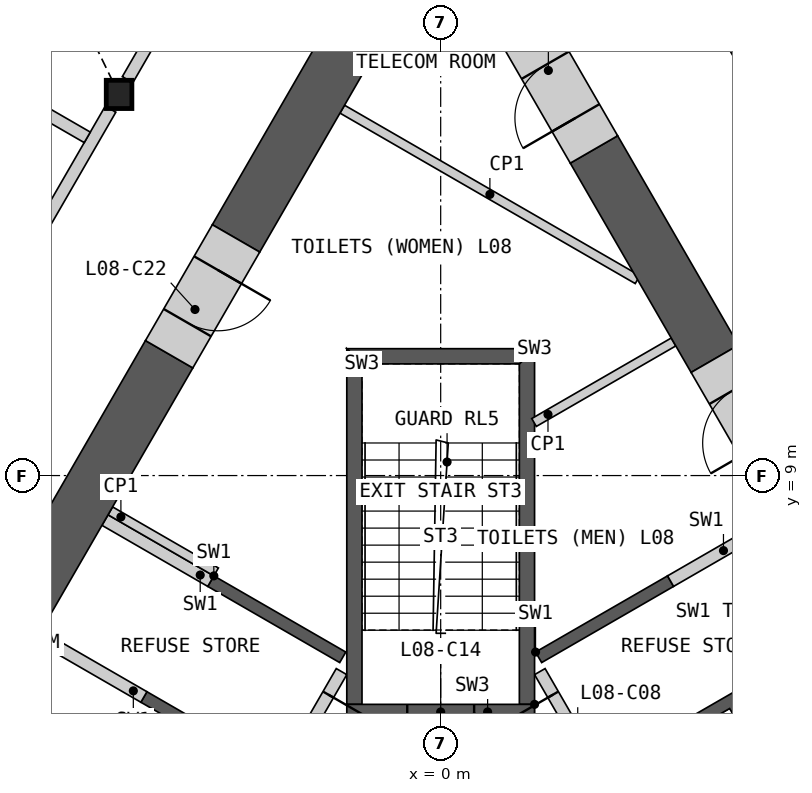
"""IFC4 building model, lengths in metres.
Left out: names, types, materials, properties, quantities, classifications, styles, units other than length and angle.
Written with IfcOpenShell. Run it as: python <this file> out.ifc"""

import sys

from ifc_helpers import new_model, si_unit, direction, frame, frame_2d, origin, origin_2d, place, context, subcontext, project, spatial, polyline, rectangle, i_section, outline, extrude, element, fill, save


model = new_model("IFC4")
c1 = context("Model", 3, precision=1e-05, world=origin(), true_north=direction((0.0, 1.0)))
c2 = subcontext(c1, "Body", "Model", "MODEL_VIEW")
j1 = project(units=[si_unit("LENGTHUNIT", "METRE"), si_unit("PLANEANGLEUNIT", "RADIAN")], contexts=[c1])
p1 = place(None, origin())
s1 = spatial("IfcSite", under=j1, at=p1, CompositionType="ELEMENT")
p2 = place(p1, origin())
s2 = spatial("IfcBuilding", under=s1, at=p2, CompositionType="ELEMENT")
p3 = place(p2, frame((0.0, 0.0, 42.6)))
s3 = spatial("IfcBuildingStorey", under=s2, at=p3, CompositionType="ELEMENT", Elevation=42.6)
p4 = place(p3, frame((-5.289, 15.269, 0.0), z_axis=(0.0, 0.0, 1.0), x_axis=(1.0, 0.0, 0.0)))
e1 = element("IfcColumn", 1, at=p4, inside=s3, PredefinedType="COLUMN", context=c2, shape_type="SweptSolid", body=[
    extrude(i_section(OverallWidth=0.421, OverallDepth=0.465, WebThickness=0.045, FlangeThickness=0.072, at=origin_2d()), origin(), (0.0, 0.0, 1.0), 4.2),
])
p5 = place(p3, origin())
e2 = element("IfcWall", 2, at=p5, inside=s3, PredefinedType="SHEAR", context=c2, shape_type="SweptSolid", body=[
    extrude(outline(polyline([(1.561, 6.097), (3.731, 7.35), (3.831, 7.177), (1.66, 5.924), (1.561, 6.097)])), origin(), (0.0, 0.0, 1.0), 3.8),
])
p6 = place(p3, origin())
e3 = element("IfcWall", 3, at=p6, inside=s3, PredefinedType="SHEAR", context=c2, shape_type="SweptSolid", body=[
    extrude(outline(polyline([(2.66, 4.192), (4.831, 5.445), (8.231, -0.444), (6.061, -1.697), (5.96, -1.524), (7.952, -0.374), (6.952, 1.358), (4.96, 0.208), (4.861, 0.381), (6.852, 1.531), (5.852, 3.263), (3.861, 2.113), (3.76, 2.287), (5.752, 3.437), (4.752, 5.169), (2.76, 4.019), (2.66, 4.192)])), origin(), (0.0, 0.0, 1.0), 3.8),
])
p7 = place(p3, frame((5.817, -1.476, 0.0), z_axis=(0.0, 0.0, 1.0), x_axis=(-0.500002616675, 0.866023893041, 0.0)))
e4 = element("IfcWall", 4, at=p7, inside=s3, PredefinedType="SOLIDWALL", context=c2, shape_type="SweptSolid", body=[
    extrude(rectangle(XDim=8.373, YDim=0.2, at=frame_2d((4.187, 0.0))), origin(), (0.0, 0.0, 1.0), 3.8),
])
p8 = place(p7, frame((0.337, 0.0, 0.0)))
e5 = element("IfcOpeningElement", 5, at=p8, cuts=e4, PredefinedType="OPENING", context=c2, shape_type="SweptSolid", body=[
    extrude(rectangle(XDim=1.1, YDim=2.1, at=frame_2d((0.55, 1.05))), frame((0.0, 0.11, 0.0), z_axis=(0.0, -1.0, 0.0), x_axis=(1.0, 0.0, 0.0)), (0.0, 0.0, 1.0), 0.22),
])
p9 = place(p7, frame((2.537, 0.0, 0.0)))
e6 = element("IfcOpeningElement", 6, at=p9, cuts=e4, PredefinedType="OPENING", context=c2, shape_type="SweptSolid", body=[
    extrude(rectangle(XDim=1.1, YDim=2.1, at=frame_2d((0.55, 1.05))), frame((0.0, 0.11, 0.0), z_axis=(0.0, -1.0, 0.0), x_axis=(1.0, 0.0, 0.0)), (0.0, 0.0, 1.0), 0.22),
])
p10 = place(p7, frame((4.737, 0.0, 0.0)))
e7 = element("IfcOpeningElement", 7, at=p10, cuts=e4, PredefinedType="OPENING", context=c2, shape_type="SweptSolid", body=[
    extrude(rectangle(XDim=1.1, YDim=2.1, at=frame_2d((0.55, 1.05))), frame((0.0, 0.11, 0.0), z_axis=(0.0, -1.0, 0.0), x_axis=(1.0, 0.0, 0.0)), (0.0, 0.0, 1.0), 0.22),
])
p11 = place(p7, frame((7.037, 0.0, 0.0)))
e8 = element("IfcOpeningElement", 8, at=p11, cuts=e4, PredefinedType="OPENING", context=c2, shape_type="SweptSolid", body=[
    extrude(rectangle(XDim=0.9, YDim=2.1, at=frame_2d((0.45, 1.05))), frame((0.0, 0.11, 0.0), z_axis=(0.0, -1.0, 0.0), x_axis=(1.0, 0.0, 0.0)), (0.0, 0.0, 1.0), 0.22),
])
p12 = place(p3, frame((3.781, 7.263, 0.0), z_axis=(0.0, 0.0, 1.0), x_axis=(0.865983199114, 0.50007309351, 0.0)))
e9 = element("IfcWall", 9, at=p12, inside=s3, PredefinedType="SHEAR", context=c2, shape_type="SweptSolid", body=[
    extrude(rectangle(XDim=2.009, YDim=0.2, at=frame_2d((1.004, 0.0))), origin(), (0.0, 0.0, 1.0), 3.8),
])
p13 = place(p3, origin())
e10 = element("IfcWall", 10, at=p13, inside=s3, PredefinedType="SHEAR", context=c2, shape_type="SweptSolid", body=[
    extrude(outline(polyline([(-2.76, 4.019), (-4.931, 5.272), (-4.831, 5.445), (-2.66, 4.192), (-2.76, 4.019)])), origin(), (0.0, 0.0, 1.0), 3.8),
])
p14 = place(p3, origin())
e11 = element("IfcWall", 11, at=p14, inside=s3, PredefinedType="SHEAR", context=c2, shape_type="SweptSolid", body=[
    extrude(outline(polyline([(-3.731, 7.35), (-1.561, 6.097), (-1.66, 5.924), (-3.831, 7.177), (-3.731, 7.35)])), origin(), (0.0, 0.0, 1.0), 3.8),
])
p15 = place(p3, frame((-1.631, 5.776, 0.0), z_axis=(0.0, 0.0, 1.0), x_axis=(-0.499992876559, -0.866029516466, 0.0)))
e12 = element("IfcWall", 12, at=p15, inside=s3, PredefinedType="SOLIDWALL", context=c2, shape_type="SweptSolid", body=[
    extrude(rectangle(XDim=6.486, YDim=0.2, at=frame_2d((3.243, 0.0))), origin(), (0.0, 0.0, 1.0), 3.8),
])
p16 = place(p15, frame((0.437, 0.0, 0.0)))
e13 = element("IfcOpeningElement", 13, at=p16, cuts=e12, PredefinedType="OPENING", context=c2, shape_type="SweptSolid", body=[
    extrude(rectangle(XDim=0.9, YDim=2.1, at=frame_2d((0.45, 1.05))), frame((0.0, 0.11, 0.0), z_axis=(0.0, -1.0, 0.0), x_axis=(1.0, 0.0, 0.0)), (0.0, 0.0, 1.0), 0.22),
])
p17 = place(p15, frame((2.637, 0.0, 0.0)))
e14 = element("IfcOpeningElement", 14, at=p17, cuts=e12, PredefinedType="OPENING", context=c2, shape_type="SweptSolid", body=[
    extrude(rectangle(XDim=0.9, YDim=2.1, at=frame_2d((0.45, 1.05))), frame((0.0, 0.11, 0.0), z_axis=(0.0, -1.0, 0.0), x_axis=(1.0, 0.0, 0.0)), (0.0, 0.0, 1.0), 0.22),
])
p18 = place(p3, frame((-3.781, 7.263, 0.0), z_axis=(0.0, 0.0, 1.0), x_axis=(-0.865983199114, 0.50007309351, 0.0)))
e15 = element("IfcWall", 15, at=p18, inside=s3, PredefinedType="SHEAR", context=c2, shape_type="SweptSolid", body=[
    extrude(rectangle(XDim=2.009, YDim=0.2, at=frame_2d((1.004, 0.0))), origin(), (0.0, 0.0, 1.0), 3.8),
])
p19 = place(p3, frame((-4.881, 5.358, 0.0), z_axis=(0.0, 0.0, 1.0), x_axis=(-0.866035824272, 0.499981950752, 0.0)))
e16 = element("IfcWall", 16, at=p19, inside=s3, PredefinedType="SHEAR", context=c2, shape_type="SweptSolid", body=[
    extrude(rectangle(XDim=2.009, YDim=0.2, at=frame_2d((1.004, 0.0))), origin(), (0.0, 0.0, 1.0), 3.8),
])
p20 = place(p3, origin())
e17 = element("IfcWall", 17, at=p20, inside=s3, PredefinedType="SHEAR", context=c2, shape_type="SweptSolid", body=[
    extrude(outline(polyline([(1.544, 5.237), (1.544, 11.087), (1.294, 10.837), (1.294, 5.237), (1.544, 5.237)])), origin(), (0.0, 0.0, 1.0), 3.8),
])
p21 = place(p3, origin())
e18 = element("IfcWall", 18, at=p21, inside=s3, PredefinedType="SHEAR", context=c2, shape_type="SweptSolid", body=[
    extrude(outline(polyline([(1.544, 11.087), (-1.544, 11.087), (-1.294, 10.837), (1.294, 10.837), (1.544, 11.087)])), origin(), (0.0, 0.0, 1.0), 3.8),
])
p22 = place(p3, origin())
e19 = element("IfcWall", 19, at=p22, inside=s3, PredefinedType="SHEAR", context=c2, shape_type="SweptSolid", body=[
    extrude(outline(polyline([(-1.294, 10.837), (-1.544, 11.087), (-1.544, 5.237), (-1.294, 5.237), (-1.294, 10.837)])), origin(), (0.0, 0.0, 1.0), 3.8),
])
p23 = place(p3, frame((1.544, 5.112, 0.0), z_axis=(0.0, 0.0, 1.0), x_axis=(-1.0, 0.0, 0.0)))
e20 = element("IfcWall", 20, at=p23, inside=s3, PredefinedType="SHEAR", context=c2, shape_type="SweptSolid", body=[
    extrude(rectangle(XDim=3.088, YDim=0.25, at=frame_2d((1.544, 0.0))), origin(), (0.0, 0.0, 1.0), 3.8),
])
p24 = place(p23, frame((0.994, 0.0, 0.0)))
e21 = element("IfcOpeningElement", 21, at=p24, cuts=e20, PredefinedType="OPENING", context=c2, shape_type="SweptSolid", body=[
    extrude(rectangle(XDim=1.1, YDim=2.1, at=frame_2d((0.55, 1.05))), frame((0.0, 0.135, 0.0), z_axis=(0.0, -1.0, 0.0), x_axis=(1.0, 0.0, 0.0)), (0.0, 0.0, 1.0), 0.27),
])
p25 = place(p3, frame((-3.693, 7.415, 0.0), z_axis=(0.0, 0.0, 1.0), x_axis=(-0.866035824272, 0.499981950752, 0.0)))
e22 = element("IfcWall", 22, at=p25, inside=s3, PredefinedType="PARTITIONING", context=c2, shape_type="SweptSolid", body=[
    extrude(rectangle(XDim=2.009, YDim=0.15, at=frame_2d((1.004, 0.0))), origin(), (0.0, 0.0, 1.0), 3.8),
])
p26 = place(p3, frame((3.829, 11.197, 0.0), z_axis=(0.0, 0.0, 1.0), x_axis=(-0.866016748302, -0.500014991436, 0.0)))
e23 = element("IfcWall", 23, at=p26, inside=s3, PredefinedType="PARTITIONING", context=c2, shape_type="SweptSolid", body=[
    extrude(rectangle(XDim=2.649, YDim=0.15, at=frame_2d((1.324, 0.0))), origin(), (0.0, 0.0, 1.0), 3.8),
])
p27 = place(p3, frame((-1.619, 15.026, 0.0), z_axis=(0.0, 0.0, 1.0), x_axis=(0.866015917575, -0.500016430238, 0.0)))
e24 = element("IfcWall", 24, at=p27, inside=s3, PredefinedType="PARTITIONING", context=c2, shape_type="SweptSolid", body=[
    extrude(rectangle(XDim=5.607, YDim=0.15, at=frame_2d((2.804, 0.0))), origin(), (0.0, 0.0, 1.0), 3.8),
])
p28 = place(p3, frame((4.509, 10.921, 0.0), z_axis=(0.0, 0.0, 1.0), x_axis=(-0.49999004381, 0.866031151917, 0.0)))
e25 = element("IfcWall", 25, at=p28, inside=s3, PredefinedType="SHEAR", context=c2, shape_type="SweptSolid", body=[
    extrude(rectangle(XDim=3.975, YDim=0.9, at=frame_2d((1.988, 0.0))), origin(), (0.0, 0.0, 1.0), 3.8),
])
p29 = place(p3, frame((-4.466, 10.995, 0.0), z_axis=(0.0, 0.0, 1.0), x_axis=(-0.500012427149, -0.866018228848, 0.0)))
e26 = element("IfcWall", 26, at=p29, inside=s3, PredefinedType="SHEAR", context=c2, shape_type="SweptSolid", body=[
    extrude(rectangle(XDim=7.409, YDim=0.9, at=frame_2d((3.705, 0.0))), origin(), (0.0, 0.0, 1.0), 3.8),
])
p30 = place(p3, frame((-0.39, 18.055, 0.0), z_axis=(0.0, 0.0, 1.0), x_axis=(-0.499981657175, -0.86603599376, 0.0)))
e27 = element("IfcWall", 27, at=p30, inside=s3, PredefinedType="SHEAR", context=c2, shape_type="SweptSolid", body=[
    extrude(rectangle(XDim=5.952, YDim=0.9, at=frame_2d((2.976, 0.0))), origin(), (0.0, 0.0, 1.0), 3.8),
])
p31 = place(p3, frame((5.608, 9.016, 0.0), z_axis=(0.0, 0.0, 1.0), x_axis=(-0.499994660107, 0.866028486751, 0.0)))
e28 = element("IfcWall", 28, at=p31, inside=s3, PredefinedType="SHEAR", context=c2, shape_type="SweptSolid", body=[
    extrude(rectangle(XDim=2.2, YDim=0.9, at=frame_2d((1.1, 0.0))), origin(), (0.0, 0.0, 1.0), 3.8),
])
p32 = place(p31, frame((0.6, 0.0, 0.0)))
e29 = element("IfcOpeningElement", 29, at=p32, cuts=e28, PredefinedType="OPENING", context=c2, shape_type="SweptSolid", body=[
    extrude(rectangle(XDim=1.0, YDim=2.1, at=frame_2d((0.5, 1.05))), frame((0.0, 0.46, 0.0), z_axis=(0.0, -1.0, 0.0), x_axis=(1.0, 0.0, 0.0)), (0.0, 0.0, 1.0), 0.92),
])
p33 = place(p3, frame((-3.365, 12.9, 0.0), z_axis=(0.0, 0.0, 1.0), x_axis=(-0.500077893725, -0.86598042715, 0.0)))
e30 = element("IfcWall", 30, at=p33, inside=s3, PredefinedType="SHEAR", context=c2, shape_type="SweptSolid", body=[
    extrude(rectangle(XDim=2.2, YDim=0.9, at=frame_2d((1.1, 0.0))), origin(), (0.0, 0.0, 1.0), 3.8),
])
p34 = place(p33, frame((0.6, 0.0, 0.0)))
e31 = element("IfcOpeningElement", 31, at=p34, cuts=e30, PredefinedType="OPENING", context=c2, shape_type="SweptSolid", body=[
    extrude(rectangle(XDim=1.0, YDim=2.1, at=frame_2d((0.5, 1.05))), frame((0.0, 0.46, 0.0), z_axis=(0.0, -1.0, 0.0), x_axis=(1.0, 0.0, 0.0)), (0.0, 0.0, 1.0), 0.92),
])
p35 = place(p3, frame((2.521, 14.364, 0.0), z_axis=(0.0, 0.0, 1.0), x_axis=(-0.50002983664, 0.866008176907, 0.0)))
e32 = element("IfcWall", 32, at=p35, inside=s3, PredefinedType="SHEAR", context=c2, shape_type="SweptSolid", body=[
    extrude(rectangle(XDim=2.2, YDim=0.9, at=frame_2d((1.1, 0.0))), origin(), (0.0, 0.0, 1.0), 3.8),
])
p36 = place(p35, frame((0.6, 0.0, 0.0)))
e33 = element("IfcOpeningElement", 33, at=p36, cuts=e32, PredefinedType="OPENING", context=c2, shape_type="SweptSolid", body=[
    extrude(rectangle(XDim=1.0, YDim=2.1, at=frame_2d((0.5, 1.05))), frame((0.0, 0.46, 0.0), z_axis=(0.0, -1.0, 0.0), x_axis=(1.0, 0.0, 0.0)), (0.0, 0.0, 1.0), 0.92),
])
p37 = place(p3, frame((-10.439, 6.35, 0.0), z_axis=(0.0, 0.0, 1.0), x_axis=(0.50001002959, 0.86601961312, 0.0)))
e34 = element("IfcWall", 34, at=p37, inside=s3, PredefinedType="PARTITIONING", context=c2, shape_type="SweptSolid", body=[
    extrude(rectangle(XDim=10.019, YDim=0.2, at=frame_2d((5.009, 0.0))), origin(), (0.0, 0.0, 1.0), 3.8),
])
p38 = place(p37, frame((4.159, 0.0, 0.0)))
e35 = element("IfcOpeningElement", 35, at=p38, cuts=e34, PredefinedType="OPENING", context=c2, shape_type="SweptSolid", body=[
    extrude(rectangle(XDim=1.0, YDim=2.1, at=frame_2d((0.5, 1.05))), frame((0.0, 0.11, 0.0), z_axis=(0.0, -1.0, 0.0), x_axis=(1.0, 0.0, 0.0)), (0.0, 0.0, 1.0), 0.22),
])
p39 = place(p3, frame((1.913, 21.116, 0.0), z_axis=(0.0, 0.0, 1.0), x_axis=(0.500001069878, -0.866024786089, 0.0)))
e36 = element("IfcWall", 36, at=p39, inside=s3, PredefinedType="PARTITIONING", context=c2, shape_type="SweptSolid", body=[
    extrude(rectangle(XDim=6.473, YDim=0.2, at=frame_2d((3.236, 0.0))), origin(), (0.0, 0.0, 1.0), 3.8),
])
p40 = place(p39, frame((2.787, 0.0, 0.0)))
e37 = element("IfcOpeningElement", 37, at=p40, cuts=e36, PredefinedType="OPENING", context=c2, shape_type="SweptSolid", body=[
    extrude(rectangle(XDim=1.0, YDim=2.1, at=frame_2d((0.5, 1.05))), frame((0.0, 0.11, 0.0), z_axis=(0.0, -1.0, 0.0), x_axis=(1.0, 0.0, 0.0)), (0.0, 0.0, 1.0), 0.22),
])
p41 = place(p3, frame((-5.149, 15.511, 0.0), z_axis=(0.0, 0.0, 1.0), x_axis=(0.500001069878, 0.866024786089, 0.0)))
e38 = element("IfcWall", 38, at=p41, inside=s3, PredefinedType="PARTITIONING", context=c2, shape_type="SweptSolid", body=[
    extrude(rectangle(XDim=6.473, YDim=0.2, at=frame_2d((3.236, 0.0))), origin(), (0.0, 0.0, 1.0), 3.8),
])
p42 = place(p41, frame((2.686, 0.0, 0.0)))
e39 = element("IfcOpeningElement", 39, at=p42, cuts=e38, PredefinedType="OPENING", context=c2, shape_type="SweptSolid", body=[
    extrude(rectangle(XDim=1.0, YDim=2.1, at=frame_2d((0.5, 1.05))), frame((0.0, 0.11, 0.0), z_axis=(0.0, -1.0, 0.0), x_axis=(1.0, 0.0, 0.0)), (0.0, 0.0, 1.0), 0.22),
])
p43 = place(p3, frame((-17.061, 21.057, 0.0), z_axis=(0.0, 0.0, 1.0), x_axis=(0.866020631549, -0.500008265664, 0.0)))
e40 = element("IfcWall", 40, at=p43, inside=s3, PredefinedType="PARTITIONING", context=c2, shape_type="SweptSolid", body=[
    extrude(rectangle(XDim=12.989, YDim=0.2, at=frame_2d((6.495, 0.0))), origin(), (0.0, 0.0, 1.0), 2.885),
])
p44 = place(p11, origin())
e41 = element("IfcDoor", 41, at=p44, inside=s3, OperationType="SINGLE_SWING_RIGHT", PredefinedType="DOOR", context=c2, shape_type="SweptSolid", body=[
    extrude(rectangle(XDim=0.9, YDim=2.1, at=frame_2d((0.45, 1.05))), frame((0.0, 0.025, 0.0), z_axis=(0.0, -1.0, 0.0), x_axis=(1.0, 0.0, 0.0)), (0.0, 0.0, 1.0), 0.05),
])
fill(e8, e41)
p45 = place(p16, origin())
e42 = element("IfcDoor", 42, at=p45, inside=s3, OperationType="SINGLE_SWING_LEFT", PredefinedType="DOOR", context=c2, shape_type="SweptSolid", body=[
    extrude(rectangle(XDim=0.9, YDim=2.1, at=frame_2d((0.45, 1.05))), frame((0.0, 0.025, 0.0), z_axis=(0.0, -1.0, 0.0), x_axis=(1.0, 0.0, 0.0)), (0.0, 0.0, 1.0), 0.05),
])
fill(e13, e42)
p46 = place(p24, origin())
e43 = element("IfcDoor", 43, at=p46, inside=s3, OperationType="SINGLE_SWING_LEFT", PredefinedType="DOOR", context=c2, shape_type="SweptSolid", body=[
    extrude(rectangle(XDim=1.1, YDim=2.1, at=frame_2d((0.55, 1.05))), frame((0.0, 0.025, 0.0), z_axis=(0.0, -1.0, 0.0), x_axis=(1.0, 0.0, 0.0)), (0.0, 0.0, 1.0), 0.05),
])
fill(e21, e43)
p47 = place(p32, origin())
e44 = element("IfcDoor", 44, at=p47, inside=s3, OperationType="SINGLE_SWING_LEFT", PredefinedType="DOOR", context=c2, shape_type="SweptSolid", body=[
    extrude(rectangle(XDim=1.0, YDim=2.1, at=frame_2d((0.5, 1.05))), frame((0.0, 0.205, 0.0), z_axis=(0.0, -1.0, 0.0), x_axis=(1.0, 0.0, 0.0)), (0.0, 0.0, 1.0), 0.05),
])
fill(e29, e44)
p48 = place(p34, origin())
e45 = element("IfcDoor", 45, at=p48, inside=s3, OperationType="SINGLE_SWING_LEFT", PredefinedType="DOOR", context=c2, shape_type="SweptSolid", body=[
    extrude(rectangle(XDim=1.0, YDim=2.1, at=frame_2d((0.5, 1.05))), frame((0.0, 0.205, 0.0), z_axis=(0.0, -1.0, 0.0), x_axis=(1.0, 0.0, 0.0)), (0.0, 0.0, 1.0), 0.05),
])
fill(e31, e45)
p49 = place(p36, origin())
e46 = element("IfcDoor", 46, at=p49, inside=s3, OperationType="SINGLE_SWING_LEFT", PredefinedType="DOOR", context=c2, shape_type="SweptSolid", body=[
    extrude(rectangle(XDim=1.0, YDim=2.1, at=frame_2d((0.5, 1.05))), frame((0.0, 0.205, 0.0), z_axis=(0.0, -1.0, 0.0), x_axis=(1.0, 0.0, 0.0)), (0.0, 0.0, 1.0), 0.05),
])
fill(e33, e46)
save(model, sys.argv[1])
